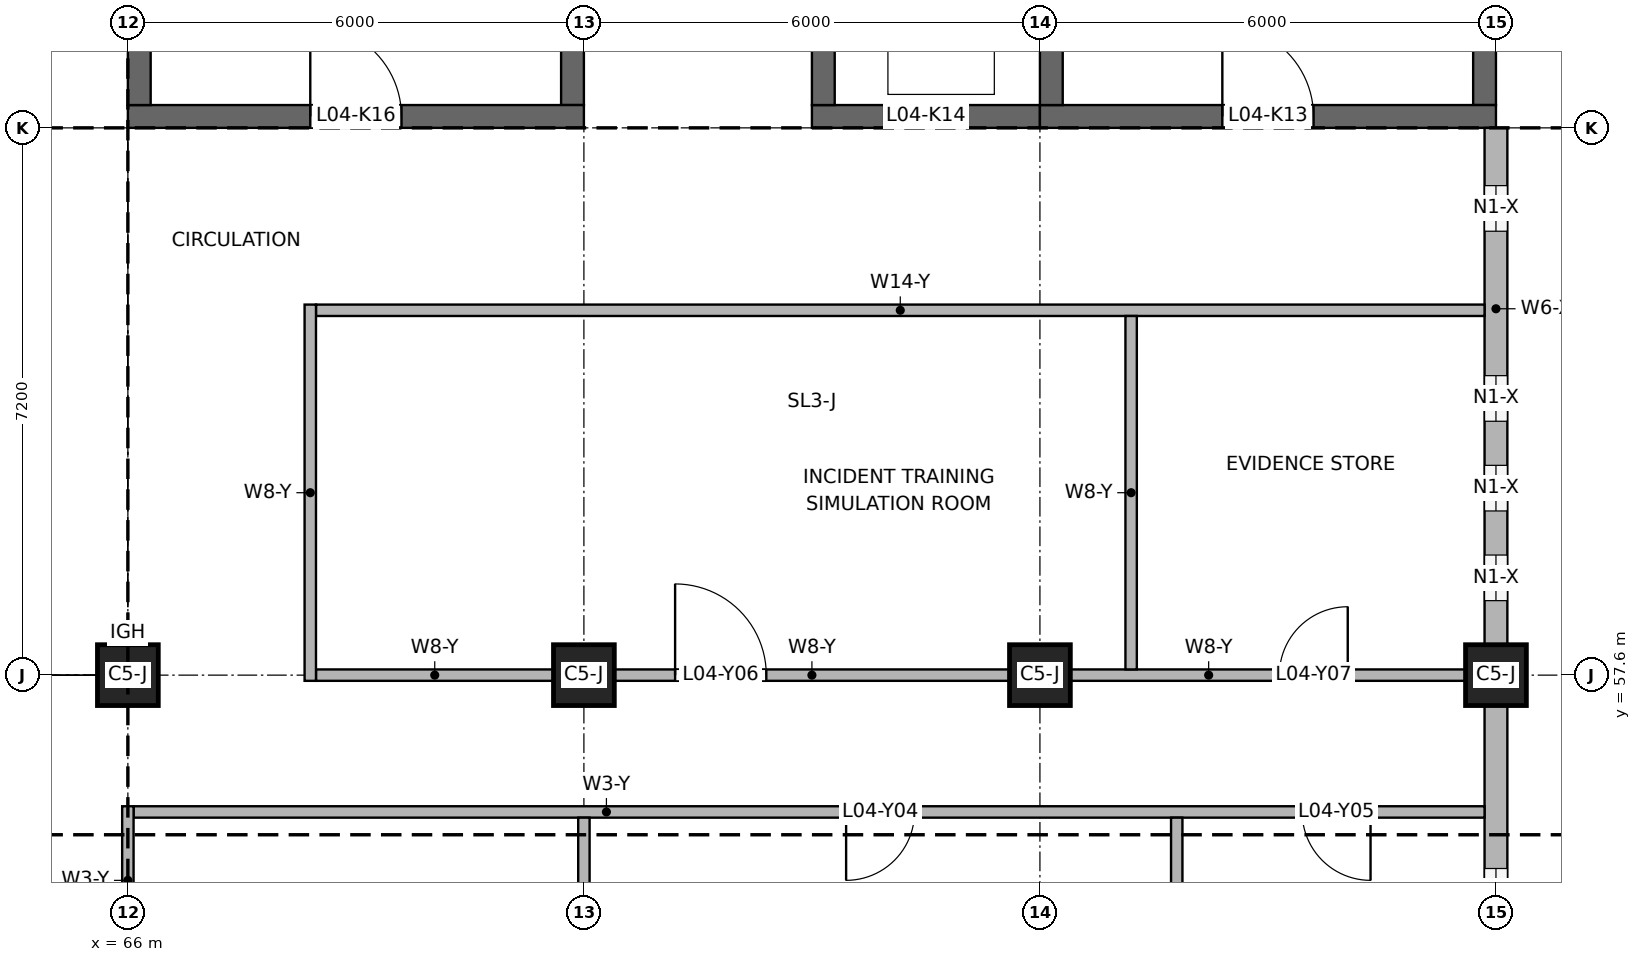
"""IFC4 building model, lengths in metres.
Left out: names, types, materials, properties, quantities, classifications, styles, units other than length and angle.
Written with IfcOpenShell. Run it as: python <this file> out.ifc"""

import sys

from ifc_helpers import new_model, si_unit, direction, frame, frame_2d, origin, origin_2d, place, context, subcontext, project, spatial, rectangle, extrude, element, fill, save


model = new_model("IFC4")
c1 = context("Model", 3, precision=1e-05, world=origin(), true_north=direction((0.0, 1.0)))
c2 = subcontext(c1, "Body", "Model", "MODEL_VIEW")
j1 = project(units=[si_unit("LENGTHUNIT", "METRE"), si_unit("PLANEANGLEUNIT", "RADIAN")], contexts=[c1])
p1 = place(None, origin())
s1 = spatial("IfcSite", under=j1, at=p1, CompositionType="ELEMENT")
p2 = place(p1, origin())
s2 = spatial("IfcBuilding", under=s1, at=p2, CompositionType="ELEMENT")
p3 = place(p2, frame((0.0, 0.0, 16.8)))
s3 = spatial("IfcBuildingStorey", under=s2, at=p3, CompositionType="ELEMENT", Elevation=16.8)
p4 = place(p3, frame((78.0, 64.95, 0.0), z_axis=(0.0, 0.0, 1.0), x_axis=(1.0, 0.0, 0.0)))
e1 = element("IfcWall", 1, at=p4, inside=s3, PredefinedType="SHEAR", context=c2, shape_type="SweptSolid", body=[
    extrude(rectangle(XDim=6.0, YDim=0.3, at=frame_2d((3.0, 0.0))), origin(), (0.0, 0.0, 1.0), 3.95),
])
p5 = place(p4, frame((2.4, 0.0, 0.0)))
e2 = element("IfcOpeningElement", 2, at=p5, cuts=e1, PredefinedType="OPENING", context=c2, shape_type="SweptSolid", body=[
    extrude(rectangle(XDim=1.2, YDim=2.1, at=frame_2d((0.6, 1.05))), frame((0.0, 0.16, 0.0), z_axis=(0.0, -1.0, 0.0), x_axis=(1.0, 0.0, 0.0)), (0.0, 0.0, 1.0), 0.32),
])
for number, where, z_axis, x_axis in (
    (3, (78.15, 65.1, 0.0), (0.0, 0.0, 1.0), (0.0, 1.0, 0.0)),
    (4, (83.85, 65.1, 0.0), (0.0, 0.0, 1.0), (0.0, 1.0, 0.0)),
):
    element("IfcWall", number, at=place(p3, frame(where, z_axis=z_axis, x_axis=x_axis)), inside=s3, PredefinedType="SHEAR", context=c2, shape_type="SweptSolid", body=[
        extrude(rectangle(XDim=6.6, YDim=0.3, at=frame_2d((3.3, 0.0))), origin(), (0.0, 0.0, 1.0), 3.95),
    ])
p6 = place(p3, frame((75.0, 64.95, 0.0), z_axis=(0.0, 0.0, 1.0), x_axis=(1.0, 0.0, 0.0)))
e5 = element("IfcWall", 5, at=p6, inside=s3, PredefinedType="SHEAR", context=c2, shape_type="SweptSolid", body=[
    extrude(rectangle(XDim=3.0, YDim=0.3, at=frame_2d((1.5, 0.0))), origin(), (0.0, 0.0, 1.0), 4.2),
])
p7 = place(p6, frame((0.95, 0.0, 0.0)))
e6 = element("IfcOpeningElement", 6, at=p7, cuts=e5, PredefinedType="OPENING", context=c2, shape_type="SweptSolid", body=[
    extrude(rectangle(XDim=1.1, YDim=2.1, at=frame_2d((0.55, 1.05))), frame((0.0, 0.16, 0.0), z_axis=(0.0, -1.0, 0.0), x_axis=(1.0, 0.0, 0.0)), (0.0, 0.0, 1.0), 0.32),
])
p8 = place(p3, frame((75.15, 65.1, 0.0), z_axis=(0.0, 0.0, 1.0), x_axis=(0.0, 1.0, 0.0)))
e7 = element("IfcWall", 7, at=p8, inside=s3, PredefinedType="SHEAR", context=c2, shape_type="SweptSolid", body=[
    extrude(rectangle(XDim=3.0, YDim=0.3, at=frame_2d((1.5, 0.0))), origin(), (0.0, 0.0, 1.0), 4.2),
])
p9 = place(p3, frame((66.0, 64.95, 0.0), z_axis=(0.0, 0.0, 1.0), x_axis=(1.0, 0.0, 0.0)))
e8 = element("IfcWall", 8, at=p9, inside=s3, PredefinedType="SHEAR", context=c2, shape_type="SweptSolid", body=[
    extrude(rectangle(XDim=6.0, YDim=0.3, at=frame_2d((3.0, 0.0))), origin(), (0.0, 0.0, 1.0), 4.0),
])
p10 = place(p9, frame((2.4, 0.0, 0.0)))
e9 = element("IfcOpeningElement", 9, at=p10, cuts=e8, PredefinedType="OPENING", context=c2, shape_type="SweptSolid", body=[
    extrude(rectangle(XDim=1.2, YDim=2.1, at=frame_2d((0.6, 1.05))), frame((0.0, 0.16, 0.0), z_axis=(0.0, -1.0, 0.0), x_axis=(1.0, 0.0, 0.0)), (0.0, 0.0, 1.0), 0.32),
])
for number, where, z_axis, x_axis in (
    (10, (66.15, 65.1, 0.0), (0.0, 0.0, 1.0), (0.0, 1.0, 0.0)),
    (11, (71.85, 65.1, 0.0), (0.0, 0.0, 1.0), (0.0, 1.0, 0.0)),
):
    element("IfcWall", number, at=place(p3, frame(where, z_axis=z_axis, x_axis=x_axis)), inside=s3, PredefinedType="SHEAR", context=c2, shape_type="SweptSolid", body=[
        extrude(rectangle(XDim=6.6, YDim=0.3, at=frame_2d((3.3, 0.0))), origin(), (0.0, 0.0, 1.0), 4.0),
    ])
for number, where, z_axis, x_axis in (
    (12, (66.0, 57.6, 0.0), (0.0, 0.0, 1.0), (1.0, 0.0, 0.0)),
    (13, (72.0, 57.6, 0.0), (0.0, 0.0, 1.0), (1.0, 0.0, 0.0)),
    (14, (78.0, 57.6, 0.0), (0.0, 0.0, 1.0), (1.0, 0.0, 0.0)),
    (15, (84.0, 57.6, 0.0), (0.0, 0.0, 1.0), (1.0, 0.0, 0.0)),
):
    element("IfcColumn", number, at=place(p3, frame(where, z_axis=z_axis, x_axis=x_axis)), inside=s3, PredefinedType="COLUMN", context=c2, shape_type="SweptSolid", body=[
        extrude(rectangle(XDim=0.8, YDim=0.8, at=origin_2d()), origin(), (0.0, 0.0, 1.0), 4.0),
    ])
p11 = place(p3, frame((84.0, 50.8, 0.0), z_axis=(0.0, 0.0, 1.0), x_axis=(0.0, 1.0, 0.0)))
e16 = element("IfcWall", 16, at=p11, inside=s3, PredefinedType="SOLIDWALL", context=c2, shape_type="SweptSolid", body=[
    extrude(rectangle(XDim=6.4, YDim=0.3, at=frame_2d((3.2, 0.0))), origin(), (0.0, 0.0, 1.0), 3.1),
])
p12 = place(p11, frame((0.464, 0.0, 0.9)))
e17 = element("IfcOpeningElement", 17, at=p12, cuts=e16, PredefinedType="OPENING", context=c2, shape_type="SweptSolid", body=[
    extrude(rectangle(XDim=0.6, YDim=1.9, at=frame_2d((0.3, 0.95))), frame((0.0, 0.16, 0.0), z_axis=(0.0, -1.0, 0.0), x_axis=(1.0, 0.0, 0.0)), (0.0, 0.0, 1.0), 0.32),
])
p13 = place(p11, frame((1.528, 0.0, 0.9)))
e18 = element("IfcOpeningElement", 18, at=p13, cuts=e16, PredefinedType="OPENING", context=c2, shape_type="SweptSolid", body=[
    extrude(rectangle(XDim=0.6, YDim=1.9, at=frame_2d((0.3, 0.95))), frame((0.0, 0.16, 0.0), z_axis=(0.0, -1.0, 0.0), x_axis=(1.0, 0.0, 0.0)), (0.0, 0.0, 1.0), 0.32),
])
p14 = place(p11, frame((2.592, 0.0, 0.9)))
e19 = element("IfcOpeningElement", 19, at=p14, cuts=e16, PredefinedType="OPENING", context=c2, shape_type="SweptSolid", body=[
    extrude(rectangle(XDim=0.6, YDim=1.9, at=frame_2d((0.3, 0.95))), frame((0.0, 0.16, 0.0), z_axis=(0.0, -1.0, 0.0), x_axis=(1.0, 0.0, 0.0)), (0.0, 0.0, 1.0), 0.32),
])
p15 = place(p11, frame((3.656, 0.0, 0.9)))
e20 = element("IfcOpeningElement", 20, at=p15, cuts=e16, PredefinedType="OPENING", context=c2, shape_type="SweptSolid", body=[
    extrude(rectangle(XDim=0.6, YDim=1.9, at=frame_2d((0.3, 0.95))), frame((0.0, 0.16, 0.0), z_axis=(0.0, -1.0, 0.0), x_axis=(1.0, 0.0, 0.0)), (0.0, 0.0, 1.0), 0.32),
])
p16 = place(p3, frame((84.0, 58.0, 0.0), z_axis=(0.0, 0.0, 1.0), x_axis=(0.0, 1.0, 0.0)))
e21 = element("IfcWall", 21, at=p16, inside=s3, PredefinedType="SOLIDWALL", context=c2, shape_type="SweptSolid", body=[
    extrude(rectangle(XDim=6.8, YDim=0.3, at=frame_2d((3.4, 0.0))), origin(), (0.0, 0.0, 1.0), 3.1),
])
p17 = place(p16, frame((0.58, 0.0, 0.9)))
e22 = element("IfcOpeningElement", 22, at=p17, cuts=e21, PredefinedType="OPENING", context=c2, shape_type="SweptSolid", body=[
    extrude(rectangle(XDim=0.6, YDim=1.9, at=frame_2d((0.3, 0.95))), frame((0.0, 0.16, 0.0), z_axis=(0.0, -1.0, 0.0), x_axis=(1.0, 0.0, 0.0)), (0.0, 0.0, 1.0), 0.32),
])
p18 = place(p16, frame((1.76, 0.0, 0.9)))
e23 = element("IfcOpeningElement", 23, at=p18, cuts=e21, PredefinedType="OPENING", context=c2, shape_type="SweptSolid", body=[
    extrude(rectangle(XDim=0.6, YDim=1.9, at=frame_2d((0.3, 0.95))), frame((0.0, 0.16, 0.0), z_axis=(0.0, -1.0, 0.0), x_axis=(1.0, 0.0, 0.0)), (0.0, 0.0, 1.0), 0.32),
])
p19 = place(p16, frame((2.94, 0.0, 0.9)))
e24 = element("IfcOpeningElement", 24, at=p19, cuts=e21, PredefinedType="OPENING", context=c2, shape_type="SweptSolid", body=[
    extrude(rectangle(XDim=0.6, YDim=1.9, at=frame_2d((0.3, 0.95))), frame((0.0, 0.16, 0.0), z_axis=(0.0, -1.0, 0.0), x_axis=(1.0, 0.0, 0.0)), (0.0, 0.0, 1.0), 0.32),
])
p20 = place(p16, frame((5.44, 0.0, 0.9)))
e25 = element("IfcOpeningElement", 25, at=p20, cuts=e21, PredefinedType="OPENING", context=c2, shape_type="SweptSolid", body=[
    extrude(rectangle(XDim=0.6, YDim=1.9, at=frame_2d((0.3, 0.95))), frame((0.0, 0.16, 0.0), z_axis=(0.0, -1.0, 0.0), x_axis=(1.0, 0.0, 0.0)), (0.0, 0.0, 1.0), 0.32),
])
p21 = place(p2, frame((0.0, 0.0, 12.6)))
s4 = spatial("IfcBuildingStorey", under=s2, at=p21, CompositionType="ELEMENT", Elevation=12.6)
p22 = place(p21, frame((66.0, 58.1, 0.0), z_axis=(0.0, 0.0, 1.0), x_axis=(0.0, 1.0, 0.0)))
e26 = element("IfcWall", 26, at=p22, inside=s4, PredefinedType="PARTITIONING", context=c2, shape_type="SweptSolid", body=[
    extrude(rectangle(XDim=6.7, YDim=0.2, at=frame_2d((3.35, 0.0))), origin(), (0.0, 0.0, 1.0), 7.3),
])
p23 = place(p3, frame((66.0, 53.925, 0.0), z_axis=(0.0, 0.0, 1.0), x_axis=(0.0, 1.0, 0.0)))
e27 = element("IfcWall", 27, at=p23, inside=s3, PredefinedType="PARTITIONING", context=c2, shape_type="SweptSolid", body=[
    extrude(rectangle(XDim=1.95, YDim=0.15, at=frame_2d((0.975, 0.0))), origin(), (0.0, 0.0, 1.0), 3.1),
])
p24 = place(p3, frame((68.4, 57.525, 0.0), z_axis=(0.0, 0.0, 1.0), x_axis=(0.0, 1.0, 0.0)))
e28 = element("IfcWall", 28, at=p24, inside=s3, PredefinedType="PARTITIONING", context=c2, shape_type="SweptSolid", body=[
    extrude(rectangle(XDim=4.95, YDim=0.15, at=frame_2d((2.475, 0.0))), origin(), (0.0, 0.0, 1.0), 3.2),
])
p25 = place(p3, frame((72.0, 50.8, 0.0), z_axis=(0.0, 0.0, 1.0), x_axis=(0.0, 1.0, 0.0)))
e29 = element("IfcWall", 29, at=p25, inside=s3, PredefinedType="PARTITIONING", context=c2, shape_type="SweptSolid", body=[
    extrude(rectangle(XDim=4.925, YDim=0.15, at=frame_2d((2.462, 0.0))), origin(), (0.0, 0.0, 1.0), 3.1),
])
p26 = place(p3, frame((79.2, 57.675, 0.0), z_axis=(0.0, 0.0, 1.0), x_axis=(0.0, 1.0, 0.0)))
e30 = element("IfcWall", 30, at=p26, inside=s3, PredefinedType="PARTITIONING", context=c2, shape_type="SweptSolid", body=[
    extrude(rectangle(XDim=4.65, YDim=0.15, at=frame_2d((2.325, 0.0))), origin(), (0.0, 0.0, 1.0), 3.2),
])
p27 = place(p3, frame((79.8, 50.475, 0.0), z_axis=(0.0, 0.0, 1.0), x_axis=(0.0, 1.0, 0.0)))
e31 = element("IfcWall", 31, at=p27, inside=s3, PredefinedType="PARTITIONING", context=c2, shape_type="SweptSolid", body=[
    extrude(rectangle(XDim=5.25, YDim=0.15, at=frame_2d((2.625, 0.0))), origin(), (0.0, 0.0, 1.0), 3.2),
])
p28 = place(p3, frame((66.075, 55.8, 0.0), z_axis=(0.0, 0.0, 1.0), x_axis=(1.0, 0.0, 0.0)))
e32 = element("IfcWall", 32, at=p28, inside=s3, PredefinedType="PARTITIONING", context=c2, shape_type="SweptSolid", body=[
    extrude(rectangle(XDim=17.775, YDim=0.15, at=frame_2d((8.888, 0.0))), origin(), (0.0, 0.0, 1.0), 3.1),
])
p29 = place(p28, frame((9.375, 0.0, 0.0)))
e33 = element("IfcOpeningElement", 33, at=p29, cuts=e32, PredefinedType="OPENING", context=c2, shape_type="SweptSolid", body=[
    extrude(rectangle(XDim=0.9, YDim=2.1, at=frame_2d((0.45, 1.05))), frame((0.0, 0.085, 0.0), z_axis=(0.0, -1.0, 0.0), x_axis=(1.0, 0.0, 0.0)), (0.0, 0.0, 1.0), 0.17),
])
p30 = place(p28, frame((15.375, 0.0, 0.0)))
e34 = element("IfcOpeningElement", 34, at=p30, cuts=e32, PredefinedType="OPENING", context=c2, shape_type="SweptSolid", body=[
    extrude(rectangle(XDim=0.9, YDim=2.1, at=frame_2d((0.45, 1.05))), frame((0.0, 0.085, 0.0), z_axis=(0.0, -1.0, 0.0), x_axis=(1.0, 0.0, 0.0)), (0.0, 0.0, 1.0), 0.17),
])
p31 = place(p3, frame((68.475, 57.6, 0.0), z_axis=(0.0, 0.0, 1.0), x_axis=(1.0, 0.0, 0.0)))
e35 = element("IfcWall", 35, at=p31, inside=s3, PredefinedType="PARTITIONING", context=c2, shape_type="SweptSolid", body=[
    extrude(rectangle(XDim=3.125, YDim=0.15, at=frame_2d((1.562, 0.0))), origin(), (0.0, 0.0, 1.0), 3.2),
])
p32 = place(p3, frame((72.4, 57.6, 0.0), z_axis=(0.0, 0.0, 1.0), x_axis=(1.0, 0.0, 0.0)))
e36 = element("IfcWall", 36, at=p32, inside=s3, PredefinedType="PARTITIONING", context=c2, shape_type="SweptSolid", body=[
    extrude(rectangle(XDim=5.2, YDim=0.15, at=frame_2d((2.6, 0.0))), origin(), (0.0, 0.0, 1.0), 3.2),
])
p33 = place(p32, frame((0.8, 0.0, 0.0)))
e37 = element("IfcOpeningElement", 37, at=p33, cuts=e36, PredefinedType="OPENING", context=c2, shape_type="SweptSolid", body=[
    extrude(rectangle(XDim=1.2, YDim=2.1, at=frame_2d((0.6, 1.05))), frame((0.0, 0.085, 0.0), z_axis=(0.0, -1.0, 0.0), x_axis=(1.0, 0.0, 0.0)), (0.0, 0.0, 1.0), 0.17),
])
p34 = place(p3, frame((78.4, 57.6, 0.0), z_axis=(0.0, 0.0, 1.0), x_axis=(1.0, 0.0, 0.0)))
e38 = element("IfcWall", 38, at=p34, inside=s3, PredefinedType="PARTITIONING", context=c2, shape_type="SweptSolid", body=[
    extrude(rectangle(XDim=5.2, YDim=0.15, at=frame_2d((2.6, 0.0))), origin(), (0.0, 0.0, 1.0), 3.2),
])
p35 = place(p34, frame((2.75, 0.0, 0.0)))
e39 = element("IfcOpeningElement", 39, at=p35, cuts=e38, PredefinedType="OPENING", context=c2, shape_type="SweptSolid", body=[
    extrude(rectangle(XDim=0.9, YDim=2.1, at=frame_2d((0.45, 1.05))), frame((0.0, 0.085, 0.0), z_axis=(0.0, -1.0, 0.0), x_axis=(1.0, 0.0, 0.0)), (0.0, 0.0, 1.0), 0.17),
])
p36 = place(p3, frame((68.475, 62.4, 0.0), z_axis=(0.0, 0.0, 1.0), x_axis=(1.0, 0.0, 0.0)))
e40 = element("IfcWall", 40, at=p36, inside=s3, PredefinedType="PARTITIONING", context=c2, shape_type="SweptSolid", body=[
    extrude(rectangle(XDim=15.375, YDim=0.15, at=frame_2d((7.688, 0.0))), origin(), (0.0, 0.0, 1.0), 4.0),
])
p37 = place(p15, origin())
e41 = element("IfcWindow", 41, at=p37, inside=s3, PartitioningType="SINGLE_PANEL", PredefinedType="WINDOW", context=c2, shape_type="SweptSolid", body=[
    extrude(rectangle(XDim=0.6, YDim=1.9, at=frame_2d((0.3, 0.95))), frame((0.0, 0.03, 0.0), z_axis=(0.0, -1.0, 0.0), x_axis=(1.0, 0.0, 0.0)), (0.0, 0.0, 1.0), 0.06),
])
fill(e20, e41)
p38 = place(p17, origin())
e42 = element("IfcWindow", 42, at=p38, inside=s3, PartitioningType="SINGLE_PANEL", PredefinedType="WINDOW", context=c2, shape_type="SweptSolid", body=[
    extrude(rectangle(XDim=0.6, YDim=1.9, at=frame_2d((0.3, 0.95))), frame((0.0, 0.03, 0.0), z_axis=(0.0, -1.0, 0.0), x_axis=(1.0, 0.0, 0.0)), (0.0, 0.0, 1.0), 0.06),
])
fill(e22, e42)
p39 = place(p18, origin())
e43 = element("IfcWindow", 43, at=p39, inside=s3, PartitioningType="SINGLE_PANEL", PredefinedType="WINDOW", context=c2, shape_type="SweptSolid", body=[
    extrude(rectangle(XDim=0.6, YDim=1.9, at=frame_2d((0.3, 0.95))), frame((0.0, 0.03, 0.0), z_axis=(0.0, -1.0, 0.0), x_axis=(1.0, 0.0, 0.0)), (0.0, 0.0, 1.0), 0.06),
])
fill(e23, e43)
p40 = place(p19, origin())
e44 = element("IfcWindow", 44, at=p40, inside=s3, PartitioningType="SINGLE_PANEL", PredefinedType="WINDOW", context=c2, shape_type="SweptSolid", body=[
    extrude(rectangle(XDim=0.6, YDim=1.9, at=frame_2d((0.3, 0.95))), frame((0.0, 0.03, 0.0), z_axis=(0.0, -1.0, 0.0), x_axis=(1.0, 0.0, 0.0)), (0.0, 0.0, 1.0), 0.06),
])
fill(e24, e44)
p41 = place(p20, origin())
e45 = element("IfcWindow", 45, at=p41, inside=s3, PartitioningType="SINGLE_PANEL", PredefinedType="WINDOW", context=c2, shape_type="SweptSolid", body=[
    extrude(rectangle(XDim=0.6, YDim=1.9, at=frame_2d((0.3, 0.95))), frame((0.0, 0.03, 0.0), z_axis=(0.0, -1.0, 0.0), x_axis=(1.0, 0.0, 0.0)), (0.0, 0.0, 1.0), 0.06),
])
fill(e25, e45)
p42 = place(p5, origin())
e46 = element("IfcDoor", 46, at=p42, inside=s3, OperationType="SINGLE_SWING_LEFT", PredefinedType="DOOR", context=c2, shape_type="SweptSolid", body=[
    extrude(rectangle(XDim=1.2, YDim=2.1, at=frame_2d((0.6, 1.05))), frame((0.0, 0.025, 0.0), z_axis=(0.0, -1.0, 0.0), x_axis=(1.0, 0.0, 0.0)), (0.0, 0.0, 1.0), 0.05),
])
fill(e2, e46)
p43 = place(p7, origin())
e47 = element("IfcDoor", 47, at=p43, inside=s3, OperationType="DOUBLE_DOOR_SLIDING", PredefinedType="DOOR", context=c2, shape_type="SweptSolid", body=[
    extrude(rectangle(XDim=1.1, YDim=2.1, at=frame_2d((0.55, 1.05))), frame((0.0, 0.025, 0.0), z_axis=(0.0, -1.0, 0.0), x_axis=(1.0, 0.0, 0.0)), (0.0, 0.0, 1.0), 0.05),
])
fill(e6, e47)
p44 = place(p10, origin())
e48 = element("IfcDoor", 48, at=p44, inside=s3, OperationType="SINGLE_SWING_LEFT", PredefinedType="DOOR", context=c2, shape_type="SweptSolid", body=[
    extrude(rectangle(XDim=1.2, YDim=2.1, at=frame_2d((0.6, 1.05))), frame((0.0, 0.025, 0.0), z_axis=(0.0, -1.0, 0.0), x_axis=(1.0, 0.0, 0.0)), (0.0, 0.0, 1.0), 0.05),
])
fill(e9, e48)
p45 = place(p29, frame((0.9, 0.0, 0.0), z_axis=(0.0, 0.0, 1.0), x_axis=(-1.0, 0.0, 0.0)))
e49 = element("IfcDoor", 49, at=p45, inside=s3, OperationType="SINGLE_SWING_RIGHT", PredefinedType="DOOR", context=c2, shape_type="SweptSolid", body=[
    extrude(rectangle(XDim=0.9, YDim=2.1, at=frame_2d((0.45, 1.05))), frame((0.0, 0.025, 0.0), z_axis=(0.0, -1.0, 0.0), x_axis=(1.0, 0.0, 0.0)), (0.0, 0.0, 1.0), 0.05),
])
fill(e33, e49)
p46 = place(p30, frame((0.9, 0.0, 0.0), z_axis=(0.0, 0.0, 1.0), x_axis=(-1.0, 0.0, 0.0)))
e50 = element("IfcDoor", 50, at=p46, inside=s3, OperationType="SINGLE_SWING_LEFT", PredefinedType="DOOR", context=c2, shape_type="SweptSolid", body=[
    extrude(rectangle(XDim=0.9, YDim=2.1, at=frame_2d((0.45, 1.05))), frame((0.0, 0.025, 0.0), z_axis=(0.0, -1.0, 0.0), x_axis=(1.0, 0.0, 0.0)), (0.0, 0.0, 1.0), 0.05),
])
fill(e34, e50)
p47 = place(p33, origin())
e51 = element("IfcDoor", 51, at=p47, inside=s3, OperationType="SINGLE_SWING_LEFT", PredefinedType="DOOR", context=c2, shape_type="SweptSolid", body=[
    extrude(rectangle(XDim=1.2, YDim=2.1, at=frame_2d((0.6, 1.05))), frame((0.0, 0.025, 0.0), z_axis=(0.0, -1.0, 0.0), x_axis=(1.0, 0.0, 0.0)), (0.0, 0.0, 1.0), 0.05),
])
fill(e37, e51)
p48 = place(p35, origin())
e52 = element("IfcDoor", 52, at=p48, inside=s3, OperationType="SINGLE_SWING_RIGHT", PredefinedType="DOOR", context=c2, shape_type="SweptSolid", body=[
    extrude(rectangle(XDim=0.9, YDim=2.1, at=frame_2d((0.45, 1.05))), frame((0.0, 0.025, 0.0), z_axis=(0.0, -1.0, 0.0), x_axis=(1.0, 0.0, 0.0)), (0.0, 0.0, 1.0), 0.05),
])
fill(e39, e52)
save(model, sys.argv[1])
